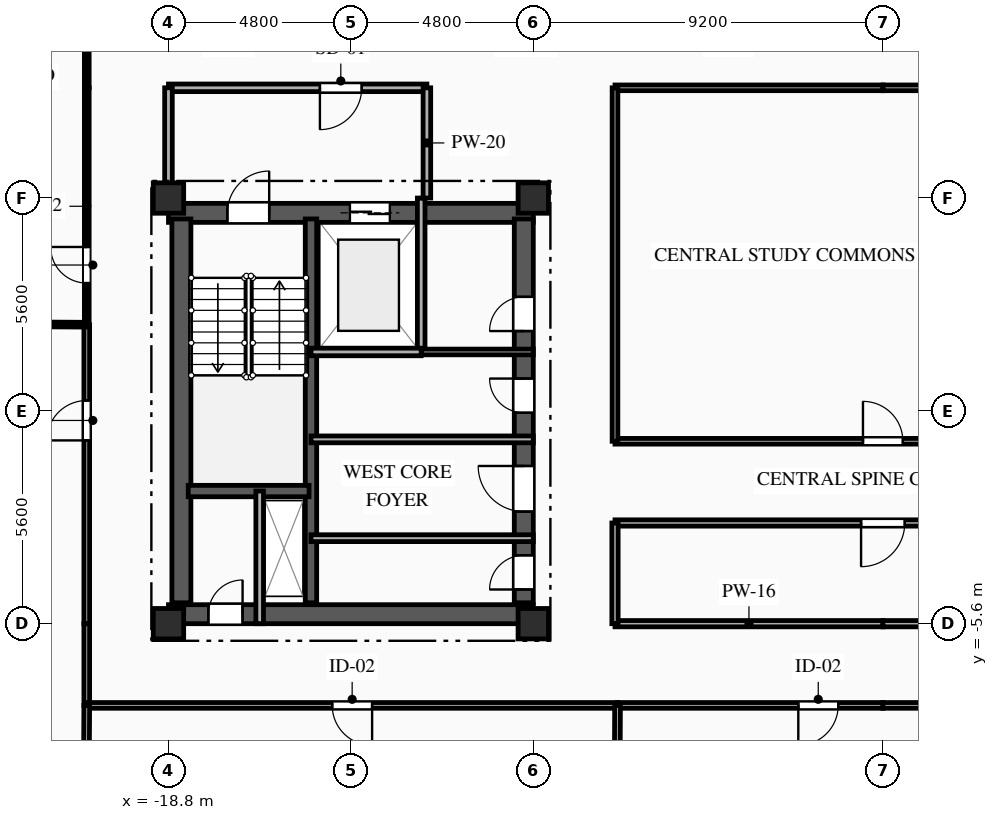
"""IFC4 building model, lengths in metres.
Left out: names, types, materials, properties, quantities, classifications, styles, units other than length and angle.
Written with IfcOpenShell. Run it as: python <this file> out.ifc"""

import sys

from ifc_helpers import new_model, si_unit, direction, frame, frame_2d, origin, origin_2d, place, context, subcontext, project, spatial, rectangle, extrude, element, fill, save


model = new_model("IFC4")
c1 = context("Model", 3, precision=1e-05, world=origin(), true_north=direction((0.0, 1.0)))
c2 = subcontext(c1, "Body", "Model", "MODEL_VIEW")
j1 = project(units=[si_unit("LENGTHUNIT", "METRE"), si_unit("PLANEANGLEUNIT", "RADIAN")], contexts=[c1])
p1 = place(None, origin())
s1 = spatial("IfcSite", under=j1, at=p1, CompositionType="ELEMENT")
p2 = place(p1, origin())
s2 = spatial("IfcBuilding", under=s1, at=p2, CompositionType="ELEMENT")
p3 = place(p2, frame((0.0, 0.0, 203.1)))
s3 = spatial("IfcBuildingStorey", under=s2, at=p3, CompositionType="ELEMENT", Elevation=203.1)
for number, where, z_axis, x_axis in (
    (1, (-18.8, -5.6, 0.0), (0.0, 0.0, 1.0), (1.0, 0.0, 0.0)),
    (2, (-18.8, 5.6, 0.0), (0.0, 0.0, 1.0), (1.0, 0.0, 0.0)),
    (3, (-9.2, -5.6, 0.0), (0.0, 0.0, 1.0), (1.0, 0.0, 0.0)),
    (4, (-9.2, 5.6, 0.0), (0.0, 0.0, 1.0), (1.0, 0.0, 0.0)),
):
    element("IfcColumn", number, at=place(p3, frame(where, z_axis=z_axis, x_axis=x_axis)), inside=s3, PredefinedType="COLUMN", context=c2, shape_type="SweptSolid", body=[
        extrude(rectangle(XDim=0.8, YDim=0.8, at=origin_2d()), origin(), (0.0, 0.0, 1.0), 3.35),
    ])
p4 = place(p3, frame((-18.8, 5.21, 0.0), z_axis=(0.0, 0.0, 1.0), x_axis=(1.0, 0.0, 0.0)))
e5 = element("IfcWall", 5, at=p4, inside=s3, PredefinedType="SHEAR", context=c2, shape_type="SweptSolid", body=[
    extrude(rectangle(XDim=9.6, YDim=0.5, at=frame_2d((4.8, 0.0))), origin(), (0.0, 0.0, 1.0), 3.04),
])
p5 = place(p4, frame((1.55, 0.0, 0.0)))
e6 = element("IfcOpeningElement", 6, at=p5, cuts=e5, PredefinedType="OPENING", context=c2, shape_type="SweptSolid", body=[
    extrude(rectangle(XDim=1.1, YDim=2.15, at=frame_2d((0.55, 1.075))), frame((0.0, 0.26, 0.0), z_axis=(0.0, -1.0, 0.0), x_axis=(1.0, 0.0, 0.0)), (0.0, 0.0, 1.0), 0.52),
])
p6 = place(p4, frame((4.775, 0.0, 0.0)))
e7 = element("IfcOpeningElement", 7, at=p6, cuts=e5, PredefinedType="OPENING", context=c2, shape_type="SweptSolid", body=[
    extrude(rectangle(XDim=1.05, YDim=2.1, at=frame_2d((0.525, 1.05))), frame((0.0, 0.26, 0.0), z_axis=(0.0, -1.0, 0.0), x_axis=(1.0, 0.0, 0.0)), (0.0, 0.0, 1.0), 0.52),
])
p7 = place(p3, frame((-18.8, -5.35, 0.0), z_axis=(0.0, 0.0, 1.0), x_axis=(1.0, 0.0, 0.0)))
e8 = element("IfcWall", 8, at=p7, inside=s3, PredefinedType="SHEAR", context=c2, shape_type="SweptSolid", body=[
    extrude(rectangle(XDim=9.6, YDim=0.5, at=frame_2d((4.8, 0.0))), origin(), (0.0, 0.0, 1.0), 3.04),
])
p8 = place(p7, frame((1.05, 0.0, 0.0)))
e9 = element("IfcOpeningElement", 9, at=p8, cuts=e8, PredefinedType="OPENING", context=c2, shape_type="SweptSolid", body=[
    extrude(rectangle(XDim=0.9, YDim=2.1, at=frame_2d((0.45, 1.05))), frame((0.0, 0.26, 0.0), z_axis=(0.0, -1.0, 0.0), x_axis=(1.0, 0.0, 0.0)), (0.0, 0.0, 1.0), 0.52),
])
p9 = place(p3, frame((-18.46, -5.05, 0.0), z_axis=(0.0, 0.0, 1.0), x_axis=(0.0, 1.0, 0.0)))
e10 = element("IfcWall", 10, at=p9, inside=s3, PredefinedType="SHEAR", context=c2, shape_type="SweptSolid", body=[
    extrude(rectangle(XDim=10.1, YDim=0.5, at=frame_2d((5.05, 0.0))), origin(), (0.0, 0.0, 1.0), 3.04),
])
p10 = place(p3, frame((-9.45, -5.05, 0.0), z_axis=(0.0, 0.0, 1.0), x_axis=(0.0, 1.0, 0.0)))
e11 = element("IfcWall", 11, at=p10, inside=s3, PredefinedType="SHEAR", context=c2, shape_type="SweptSolid", body=[
    extrude(rectangle(XDim=10.1, YDim=0.5, at=frame_2d((5.05, 0.0))), origin(), (0.0, 0.0, 1.0), 3.04),
])
p11 = place(p10, frame((7.15, 0.0, 0.0)))
e12 = element("IfcOpeningElement", 12, at=p11, cuts=e11, PredefinedType="OPENING", context=c2, shape_type="SweptSolid", body=[
    extrude(rectangle(XDim=0.9, YDim=2.1, at=frame_2d((0.45, 1.05))), frame((0.0, 0.26, 0.0), z_axis=(0.0, -1.0, 0.0), x_axis=(1.0, 0.0, 0.0)), (0.0, 0.0, 1.0), 0.52),
])
p12 = place(p10, frame((2.4, 0.0, 0.0)))
e13 = element("IfcOpeningElement", 13, at=p12, cuts=e11, PredefinedType="OPENING", context=c2, shape_type="SweptSolid", body=[
    extrude(rectangle(XDim=1.2, YDim=2.15, at=frame_2d((0.6, 1.075))), frame((0.0, 0.26, 0.0), z_axis=(0.0, -1.0, 0.0), x_axis=(1.0, 0.0, 0.0)), (0.0, 0.0, 1.0), 0.52),
])
p13 = place(p10, frame((0.35, 0.0, 0.0)))
e14 = element("IfcOpeningElement", 14, at=p13, cuts=e11, PredefinedType="OPENING", context=c2, shape_type="SweptSolid", body=[
    extrude(rectangle(XDim=0.9, YDim=2.1, at=frame_2d((0.45, 1.05))), frame((0.0, 0.26, 0.0), z_axis=(0.0, -1.0, 0.0), x_axis=(1.0, 0.0, 0.0)), (0.0, 0.0, 1.0), 0.52),
])
p14 = place(p10, frame((5.0, 0.0, 0.0)))
e15 = element("IfcOpeningElement", 15, at=p14, cuts=e11, PredefinedType="OPENING", context=c2, shape_type="SweptSolid", body=[
    extrude(rectangle(XDim=0.9, YDim=2.1, at=frame_2d((0.45, 1.05))), frame((0.0, 0.26, 0.0), z_axis=(0.0, -1.0, 0.0), x_axis=(1.0, 0.0, 0.0)), (0.0, 0.0, 1.0), 0.52),
])
p15 = place(p3, frame((-15.05, -5.05, 0.0), z_axis=(0.0, 0.0, 1.0), x_axis=(0.0, 1.0, 0.0)))
e16 = element("IfcWall", 16, at=p15, inside=s3, PredefinedType="SHEAR", context=c2, shape_type="SweptSolid", body=[
    extrude(rectangle(XDim=10.1, YDim=0.3, at=frame_2d((5.05, 0.0))), origin(), (0.0, 0.0, 1.0), 3.04),
])
p16 = place(p3, frame((-18.28, -2.11, 0.0), z_axis=(0.0, 0.0, 1.0), x_axis=(1.0, 0.0, 0.0)))
e17 = element("IfcWall", 17, at=p16, inside=s3, PredefinedType="SHEAR", context=c2, shape_type="SweptSolid", body=[
    extrude(rectangle(XDim=3.18, YDim=0.3, at=frame_2d((1.59, 0.0))), origin(), (0.0, 0.0, 1.0), 3.04),
])
p17 = place(p3, frame((-16.4, -5.6, 0.0), z_axis=(0.0, 0.0, 1.0), x_axis=(0.0, 1.0, 0.0)))
e18 = element("IfcWall", 18, at=p17, inside=s3, PredefinedType="PARTITIONING", context=c2, shape_type="SweptSolid", body=[
    extrude(rectangle(XDim=3.49, YDim=0.2, at=frame_2d((1.745, 0.0))), origin(), (0.0, 0.0, 1.0), 3.04),
])
p18 = place(p3, frame((-12.15, 1.55, 0.0), z_axis=(0.0, 0.0, 1.0), x_axis=(0.0, 1.0, 0.0)))
e19 = element("IfcWall", 19, at=p18, inside=s3, PredefinedType="PARTITIONING", context=c2, shape_type="SweptSolid", body=[
    extrude(rectangle(XDim=4.05, YDim=0.2, at=frame_2d((2.025, 0.0))), origin(), (0.0, 0.0, 1.0), 3.04),
])
p19 = place(p3, frame((-12.0, 8.5, 0.0), z_axis=(0.0, 0.0, 1.0), x_axis=(-1.0, 0.0, 0.0)))
e20 = element("IfcWall", 20, at=p19, inside=s3, PredefinedType="PARTITIONING", context=c2, shape_type="SweptSolid", body=[
    extrude(rectangle(XDim=6.8, YDim=0.2, at=frame_2d((3.4, 0.0))), origin(), (0.0, 0.0, 1.0), 3.04),
])
p20 = place(p19, frame((1.715, 0.0, 0.0)))
e21 = element("IfcOpeningElement", 21, at=p20, cuts=e20, PredefinedType="OPENING", context=c2, shape_type="SweptSolid", body=[
    extrude(rectangle(XDim=1.1, YDim=2.15, at=frame_2d((0.55, 1.075))), frame((0.0, 0.11, 0.0), z_axis=(0.0, -1.0, 0.0), x_axis=(1.0, 0.0, 0.0)), (0.0, 0.0, 1.0), 0.22),
])
p21 = place(p3, frame((-18.8, 8.5, 0.0), z_axis=(0.0, 0.0, 1.0), x_axis=(0.0, -1.0, 0.0)))
e22 = element("IfcWall", 22, at=p21, inside=s3, PredefinedType="PARTITIONING", context=c2, shape_type="SweptSolid", body=[
    extrude(rectangle(XDim=2.9, YDim=0.2, at=frame_2d((1.45, 0.0))), origin(), (0.0, 0.0, 1.0), 2.665),
])
p22 = place(p3, frame((-12.0, 5.6, 0.0), z_axis=(0.0, 0.0, 1.0), x_axis=(0.0, 1.0, 0.0)))
e23 = element("IfcWall", 23, at=p22, inside=s3, PredefinedType="PARTITIONING", context=c2, shape_type="SweptSolid", body=[
    extrude(rectangle(XDim=2.9, YDim=0.2, at=frame_2d((1.45, 0.0))), origin(), (0.0, 0.0, 1.0), 3.04),
])
p23 = place(p3, frame((-12.15, 1.55, 0.0), z_axis=(0.0, 0.0, 1.0), x_axis=(1.0, 0.0, 0.0)))
e24 = element("IfcWall", 24, at=p23, inside=s3, PredefinedType="PARTITIONING", context=c2, shape_type="SweptSolid", body=[
    extrude(rectangle(XDim=2.95, YDim=0.15, at=frame_2d((1.475, 0.0))), origin(), (0.0, 0.0, 1.0), 3.04),
])
p24 = place(p3, frame((-15.05, -3.35, 0.0), z_axis=(0.0, 0.0, 1.0), x_axis=(1.0, 0.0, 0.0)))
e25 = element("IfcWall", 25, at=p24, inside=s3, PredefinedType="PARTITIONING", context=c2, shape_type="SweptSolid", body=[
    extrude(rectangle(XDim=5.85, YDim=0.18, at=frame_2d((2.925, 0.0))), origin(), (0.0, 0.0, 1.0), 2.755),
])
p25 = place(p3, frame((-9.2, -0.75, 0.0), z_axis=(0.0, 0.0, 1.0), x_axis=(-1.0, 0.0, 0.0)))
e26 = element("IfcWall", 26, at=p25, inside=s3, PredefinedType="PARTITIONING", context=c2, shape_type="SweptSolid", body=[
    extrude(rectangle(XDim=5.85, YDim=0.18, at=frame_2d((2.925, 0.0))), origin(), (0.0, 0.0, 1.0), 3.04),
])
p26 = place(p3, frame((-20.95, 8.5, 0.0), z_axis=(0.0, 0.0, 1.0), x_axis=(0.0, 1.0, 0.0)))
e27 = element("IfcWall", 27, at=p26, inside=s3, PredefinedType="PARTITIONING", context=c2, shape_type="SweptSolid", body=[
    extrude(rectangle(XDim=2.15, YDim=0.125, at=frame_2d((1.075, 0.0))), origin(), (0.0, 0.0, 1.0), 3.04),
])
for number, where, z_axis, x_axis in (
    (28, (0.0, 8.5, 0.0), (0.0, 0.0, 1.0), (-1.0, 0.0, 0.0)),
    (29, (7.05, 8.5, 0.0), (0.0, 0.0, 1.0), (-1.0, 0.0, 0.0)),
):
    element("IfcWall", number, at=place(p3, frame(where, z_axis=z_axis, x_axis=x_axis)), inside=s3, PredefinedType="PARTITIONING", context=c2, shape_type="SweptSolid", body=[
        extrude(rectangle(XDim=7.05, YDim=0.15, at=frame_2d((3.525, 0.0))), origin(), (0.0, 0.0, 1.0), 3.04),
    ])
p27 = place(p3, frame((-20.95, -7.75, 0.0), z_axis=(0.0, 0.0, 1.0), x_axis=(0.0, 1.0, 0.0)))
e30 = element("IfcWall", 30, at=p27, inside=s3, PredefinedType="PARTITIONING", context=c2, shape_type="SweptSolid", body=[
    extrude(rectangle(XDim=2.15, YDim=0.15, at=frame_2d((1.075, 0.0))), origin(), (0.0, 0.0, 1.0), 3.04),
])
p28 = place(p3, frame((-6.983, -7.75, 0.0), z_axis=(0.0, 0.0, 1.0), x_axis=(-1.0, 0.0, 0.0)))
e31 = element("IfcWall", 31, at=p28, inside=s3, PredefinedType="PARTITIONING", context=c2, shape_type="SweptSolid", body=[
    extrude(rectangle(XDim=13.967, YDim=0.15, at=frame_2d((6.983, 0.0))), origin(), (0.0, 0.0, 1.0), 3.04),
])
p29 = place(p28, frame((6.458, 0.0, 0.0)))
e32 = element("IfcOpeningElement", 32, at=p29, cuts=e31, PredefinedType="OPENING", context=c2, shape_type="SweptSolid", body=[
    extrude(rectangle(XDim=1.05, YDim=2.15, at=frame_2d((0.525, 1.075))), frame((0.0, 0.085, 0.0), z_axis=(0.0, -1.0, 0.0), x_axis=(1.0, 0.0, 0.0)), (0.0, 0.0, 1.0), 0.17),
])
p30 = place(p3, frame((0.0, -7.75, 0.0), z_axis=(0.0, 0.0, 1.0), x_axis=(-1.0, 0.0, 0.0)))
e33 = element("IfcWall", 33, at=p30, inside=s3, PredefinedType="PARTITIONING", context=c2, shape_type="SweptSolid", body=[
    extrude(rectangle(XDim=6.983, YDim=0.15, at=frame_2d((3.491, 0.0))), origin(), (0.0, 0.0, 1.0), 3.04),
])
p31 = place(p30, frame((1.177, 0.0, 0.0)))
e34 = element("IfcOpeningElement", 34, at=p31, cuts=e33, PredefinedType="OPENING", context=c2, shape_type="SweptSolid", body=[
    extrude(rectangle(XDim=1.05, YDim=2.15, at=frame_2d((0.525, 1.075))), frame((0.0, 0.085, 0.0), z_axis=(0.0, -1.0, 0.0), x_axis=(1.0, 0.0, 0.0)), (0.0, 0.0, 1.0), 0.17),
])
p32 = place(p3, frame((-7.05, -5.6, 0.0), z_axis=(0.0, 0.0, 1.0), x_axis=(1.0, 0.0, 0.0)))
e35 = element("IfcWall", 35, at=p32, inside=s3, PredefinedType="PARTITIONING", context=c2, shape_type="SweptSolid", body=[
    extrude(rectangle(XDim=7.05, YDim=0.165, at=frame_2d((3.525, 0.0))), origin(), (0.0, 0.0, 1.0), 2.525),
])
p33 = place(p3, frame((6.983, -7.75, 0.0), z_axis=(0.0, 0.0, 1.0), x_axis=(-1.0, 0.0, 0.0)))
e36 = element("IfcWall", 36, at=p33, inside=s3, PredefinedType="PARTITIONING", context=c2, shape_type="SweptSolid", body=[
    extrude(rectangle(XDim=6.983, YDim=0.15, at=frame_2d((3.491, 0.0))), origin(), (0.0, 0.0, 1.0), 3.04),
])
p34 = place(p3, frame((0.0, -5.6, 0.0), z_axis=(0.0, 0.0, 1.0), x_axis=(1.0, 0.0, 0.0)))
e37 = element("IfcWall", 37, at=p34, inside=s3, PredefinedType="PARTITIONING", context=c2, shape_type="SweptSolid", body=[
    extrude(rectangle(XDim=7.05, YDim=0.165, at=frame_2d((3.525, 0.0))), origin(), (0.0, 0.0, 1.0), 2.525),
])
p35 = place(p3, frame((-20.95, -5.6, 0.0), z_axis=(0.0, 0.0, 1.0), x_axis=(0.0, 1.0, 0.0)))
e38 = element("IfcWall", 38, at=p35, inside=s3, PredefinedType="PARTITIONING", context=c2, shape_type="SweptSolid", body=[
    extrude(rectangle(XDim=7.867, YDim=0.15, at=frame_2d((3.934, 0.0))), origin(), (0.0, 0.0, 1.0), 3.04),
])
p36 = place(p35, frame((4.823, 0.0, 0.0)))
e39 = element("IfcOpeningElement", 39, at=p36, cuts=e38, PredefinedType="OPENING", context=c2, shape_type="SweptSolid", body=[
    extrude(rectangle(XDim=1.05, YDim=2.15, at=frame_2d((0.525, 1.075))), frame((0.0, 0.085, 0.0), z_axis=(0.0, -1.0, 0.0), x_axis=(1.0, 0.0, 0.0)), (0.0, 0.0, 1.0), 0.17),
])
p37 = place(p3, frame((-20.95, 2.267, 0.0), z_axis=(0.0, 0.0, 1.0), x_axis=(0.0, 1.0, 0.0)))
e40 = element("IfcWall", 40, at=p37, inside=s3, PredefinedType="PARTITIONING", context=c2, shape_type="SweptSolid", body=[
    extrude(rectangle(XDim=6.233, YDim=0.125, at=frame_2d((3.116, 0.0))), origin(), (0.0, 0.0, 1.0), 3.04),
])
p38 = place(p37, frame((1.095, 0.0, 0.0)))
e41 = element("IfcOpeningElement", 41, at=p38, cuts=e40, PredefinedType="OPENING", context=c2, shape_type="SweptSolid", body=[
    extrude(rectangle(XDim=0.95, YDim=2.1, at=frame_2d((0.475, 1.05))), frame((0.0, 0.073, 0.0), z_axis=(0.0, -1.0, 0.0), x_axis=(1.0, 0.0, 0.0)), (0.0, 0.0, 1.0), 0.145),
])
p39 = place(p3, frame((-7.05, -0.8, 0.0), z_axis=(0.0, 0.0, 1.0), x_axis=(1.0, 0.0, 0.0)))
e42 = element("IfcWall", 42, at=p39, inside=s3, PredefinedType="PARTITIONING", context=c2, shape_type="SweptSolid", body=[
    extrude(rectangle(XDim=14.1, YDim=0.15, at=frame_2d((7.05, 0.0))), origin(), (0.0, 0.0, 1.0), 3.04),
])
p40 = place(p39, frame((6.525, 0.0, 0.0)))
e43 = element("IfcOpeningElement", 43, at=p40, cuts=e42, PredefinedType="OPENING", context=c2, shape_type="SweptSolid", body=[
    extrude(rectangle(XDim=1.05, YDim=2.15, at=frame_2d((0.525, 1.075))), frame((0.0, 0.085, 0.0), z_axis=(0.0, -1.0, 0.0), x_axis=(1.0, 0.0, 0.0)), (0.0, 0.0, 1.0), 0.17),
])
p41 = place(p3, frame((7.05, -2.95, 0.0), z_axis=(0.0, 0.0, 1.0), x_axis=(-1.0, 0.0, 0.0)))
e44 = element("IfcWall", 44, at=p41, inside=s3, PredefinedType="PARTITIONING", context=c2, shape_type="SweptSolid", body=[
    extrude(rectangle(XDim=14.1, YDim=0.165, at=frame_2d((7.05, 0.0))), origin(), (0.0, 0.0, 1.0), 3.04),
])
p42 = place(p41, frame((6.475, 0.0, 0.0)))
e45 = element("IfcOpeningElement", 45, at=p42, cuts=e44, PredefinedType="OPENING", context=c2, shape_type="SweptSolid", body=[
    extrude(rectangle(XDim=1.15, YDim=2.15, at=frame_2d((0.575, 1.075))), frame((0.0, 0.093, 0.0), z_axis=(0.0, -1.0, 0.0), x_axis=(1.0, 0.0, 0.0)), (0.0, 0.0, 1.0), 0.185),
])
p43 = place(p3, frame((-7.05, 8.5, 0.0), z_axis=(0.0, 0.0, 1.0), x_axis=(0.0, -1.0, 0.0)))
e46 = element("IfcWall", 46, at=p43, inside=s3, PredefinedType="PARTITIONING", context=c2, shape_type="SweptSolid", body=[
    extrude(rectangle(XDim=9.3, YDim=0.15, at=frame_2d((4.65, 0.0))), origin(), (0.0, 0.0, 1.0), 3.04),
])
p44 = place(p3, frame((-7.05, -2.95, 0.0), z_axis=(0.0, 0.0, 1.0), x_axis=(0.0, -1.0, 0.0)))
e47 = element("IfcWall", 47, at=p44, inside=s3, PredefinedType="PARTITIONING", context=c2, shape_type="SweptSolid", body=[
    extrude(rectangle(XDim=2.65, YDim=0.165, at=frame_2d((1.325, 0.0))), origin(), (0.0, 0.0, 1.0), 3.04),
])
p45 = place(p3, frame((-28.021, 2.311, 0.0), z_axis=(0.0, 0.0, 1.0), x_axis=(0.99998090118, -0.006180394355, 0.0)))
e48 = element("IfcWall", 48, at=p45, inside=s3, PredefinedType="PARTITIONING", context=c2, shape_type="SweptSolid", body=[
    extrude(rectangle(XDim=7.071, YDim=0.125, at=frame_2d((3.536, 0.0))), origin(), (0.0, 0.0, 1.0), 3.04),
])
p46 = place(p3, frame((-20.95, -7.75, 0.0), z_axis=(0.0, 0.0, 1.0), x_axis=(-0.005804668564, -0.99998315277, 0.0)))
e49 = element("IfcWall", 49, at=p46, inside=s3, PredefinedType="PARTITIONING", context=c2, shape_type="SweptSolid", body=[
    extrude(rectangle(XDim=7.571, YDim=0.15, at=frame_2d((3.785, 0.0))), origin(), (0.0, 0.0, 1.0), 3.04),
])
p47 = place(p3, frame((-6.983, -7.75, 0.0), z_axis=(0.0, 0.0, 1.0), x_axis=(-0.004861916497, -0.999988180814, 0.0)))
e50 = element("IfcWall", 50, at=p47, inside=s3, PredefinedType="PARTITIONING", context=c2, shape_type="SweptSolid", body=[
    extrude(rectangle(XDim=9.039, YDim=0.15, at=frame_2d((4.519, 0.0))), origin(), (0.0, 0.0, 1.0), 3.04),
])
p48 = place(p3, frame((-15.05, 1.55, 0.0), z_axis=(0.0, 0.0, 1.0), x_axis=(1.0, 0.0, 0.0)))
e51 = element("IfcWall", 51, at=p48, inside=s3, PredefinedType="PARTITIONING", context=c2, shape_type="SweptSolid", body=[
    extrude(rectangle(XDim=2.9, YDim=0.2, at=frame_2d((1.45, 0.0))), origin(), (0.0, 0.0, 1.0), 3.04),
])
p49 = place(p5, origin())
e52 = element("IfcDoor", 52, at=p49, inside=s3, OperationType="SINGLE_SWING_RIGHT", PredefinedType="DOOR", context=c2, shape_type="SweptSolid", body=[
    extrude(rectangle(XDim=1.1, YDim=2.15, at=frame_2d((0.55, 1.075))), frame((0.0, 0.025, 0.0), z_axis=(0.0, -1.0, 0.0), x_axis=(1.0, 0.0, 0.0)), (0.0, 0.0, 1.0), 0.05),
])
fill(e6, e52)
p50 = place(p6, origin())
e53 = element("IfcDoor", 53, at=p50, inside=s3, OperationType="DOUBLE_DOOR_SLIDING", PredefinedType="DOOR", context=c2, shape_type="SweptSolid", body=[
    extrude(rectangle(XDim=1.05, YDim=2.1, at=frame_2d((0.525, 1.05))), frame((0.0, 0.025, 0.0), z_axis=(0.0, -1.0, 0.0), x_axis=(1.0, 0.0, 0.0)), (0.0, 0.0, 1.0), 0.05),
])
fill(e7, e53)
p51 = place(p8, origin())
e54 = element("IfcDoor", 54, at=p51, inside=s3, OperationType="SINGLE_SWING_RIGHT", PredefinedType="DOOR", context=c2, shape_type="SweptSolid", body=[
    extrude(rectangle(XDim=0.9, YDim=2.1, at=frame_2d((0.45, 1.05))), frame((0.0, 0.025, 0.0), z_axis=(0.0, -1.0, 0.0), x_axis=(1.0, 0.0, 0.0)), (0.0, 0.0, 1.0), 0.05),
])
fill(e9, e54)
p52 = place(p20, origin())
e55 = element("IfcDoor", 55, at=p52, inside=s3, OperationType="SINGLE_SWING_RIGHT", PredefinedType="DOOR", context=c2, shape_type="SweptSolid", body=[
    extrude(rectangle(XDim=1.1, YDim=2.15, at=frame_2d((0.55, 1.075))), frame((0.0, 0.025, 0.0), z_axis=(0.0, -1.0, 0.0), x_axis=(1.0, 0.0, 0.0)), (0.0, 0.0, 1.0), 0.05),
])
fill(e21, e55)
p53 = place(p11, origin())
e56 = element("IfcDoor", 56, at=p53, inside=s3, OperationType="SINGLE_SWING_LEFT", PredefinedType="DOOR", context=c2, shape_type="SweptSolid", body=[
    extrude(rectangle(XDim=0.9, YDim=2.1, at=frame_2d((0.45, 1.05))), frame((0.0, 0.025, 0.0), z_axis=(0.0, -1.0, 0.0), x_axis=(1.0, 0.0, 0.0)), (0.0, 0.0, 1.0), 0.05),
])
fill(e12, e56)
p54 = place(p12, origin())
e57 = element("IfcDoor", 57, at=p54, inside=s3, OperationType="SINGLE_SWING_RIGHT", PredefinedType="DOOR", context=c2, shape_type="SweptSolid", body=[
    extrude(rectangle(XDim=1.2, YDim=2.15, at=frame_2d((0.6, 1.075))), frame((0.0, 0.025, 0.0), z_axis=(0.0, -1.0, 0.0), x_axis=(1.0, 0.0, 0.0)), (0.0, 0.0, 1.0), 0.05),
])
fill(e13, e57)
p55 = place(p13, origin())
e58 = element("IfcDoor", 58, at=p55, inside=s3, OperationType="SINGLE_SWING_LEFT", PredefinedType="DOOR", context=c2, shape_type="SweptSolid", body=[
    extrude(rectangle(XDim=0.9, YDim=2.1, at=frame_2d((0.45, 1.05))), frame((0.0, 0.025, 0.0), z_axis=(0.0, -1.0, 0.0), x_axis=(1.0, 0.0, 0.0)), (0.0, 0.0, 1.0), 0.05),
])
fill(e14, e58)
p56 = place(p14, origin())
e59 = element("IfcDoor", 59, at=p56, inside=s3, OperationType="SINGLE_SWING_RIGHT", PredefinedType="DOOR", context=c2, shape_type="SweptSolid", body=[
    extrude(rectangle(XDim=0.9, YDim=2.1, at=frame_2d((0.45, 1.05))), frame((0.0, 0.025, 0.0), z_axis=(0.0, -1.0, 0.0), x_axis=(1.0, 0.0, 0.0)), (0.0, 0.0, 1.0), 0.05),
])
fill(e15, e59)
p57 = place(p29, origin())
e60 = element("IfcDoor", 60, at=p57, inside=s3, OperationType="SINGLE_SWING_LEFT", PredefinedType="DOOR", context=c2, shape_type="SweptSolid", body=[
    extrude(rectangle(XDim=1.05, YDim=2.15, at=frame_2d((0.525, 1.075))), frame((0.0, 0.025, 0.0), z_axis=(0.0, -1.0, 0.0), x_axis=(1.0, 0.0, 0.0)), (0.0, 0.0, 1.0), 0.05),
])
fill(e32, e60)
p58 = place(p31, origin())
e61 = element("IfcDoor", 61, at=p58, inside=s3, OperationType="SINGLE_SWING_RIGHT", PredefinedType="DOOR", context=c2, shape_type="SweptSolid", body=[
    extrude(rectangle(XDim=1.05, YDim=2.15, at=frame_2d((0.525, 1.075))), frame((0.0, 0.025, 0.0), z_axis=(0.0, -1.0, 0.0), x_axis=(1.0, 0.0, 0.0)), (0.0, 0.0, 1.0), 0.05),
])
fill(e34, e61)
p59 = place(p36, origin())
e62 = element("IfcDoor", 62, at=p59, inside=s3, OperationType="SINGLE_SWING_LEFT", PredefinedType="DOOR", context=c2, shape_type="SweptSolid", body=[
    extrude(rectangle(XDim=1.05, YDim=2.15, at=frame_2d((0.525, 1.075))), frame((0.0, 0.025, 0.0), z_axis=(0.0, -1.0, 0.0), x_axis=(1.0, 0.0, 0.0)), (0.0, 0.0, 1.0), 0.05),
])
fill(e39, e62)
p60 = place(p38, origin())
e63 = element("IfcDoor", 63, at=p60, inside=s3, OperationType="SINGLE_SWING_RIGHT", PredefinedType="DOOR", context=c2, shape_type="SweptSolid", body=[
    extrude(rectangle(XDim=0.95, YDim=2.1, at=frame_2d((0.475, 1.05))), frame((0.0, 0.025, 0.0), z_axis=(0.0, -1.0, 0.0), x_axis=(1.0, 0.0, 0.0)), (0.0, 0.0, 1.0), 0.05),
])
fill(e41, e63)
p61 = place(p40, origin())
e64 = element("IfcDoor", 64, at=p61, inside=s3, OperationType="SINGLE_SWING_LEFT", PredefinedType="DOOR", context=c2, shape_type="SweptSolid", body=[
    extrude(rectangle(XDim=1.05, YDim=2.15, at=frame_2d((0.525, 1.075))), frame((0.0, 0.025, 0.0), z_axis=(0.0, -1.0, 0.0), x_axis=(1.0, 0.0, 0.0)), (0.0, 0.0, 1.0), 0.05),
])
fill(e43, e64)
p62 = place(p42, origin())
e65 = element("IfcDoor", 65, at=p62, inside=s3, OperationType="SINGLE_SWING_RIGHT", PredefinedType="DOOR", context=c2, shape_type="SweptSolid", body=[
    extrude(rectangle(XDim=1.15, YDim=2.15, at=frame_2d((0.575, 1.075))), frame((0.0, 0.025, 0.0), z_axis=(0.0, -1.0, 0.0), x_axis=(1.0, 0.0, 0.0)), (0.0, 0.0, 1.0), 0.05),
])
fill(e45, e65)
save(model, sys.argv[1])
